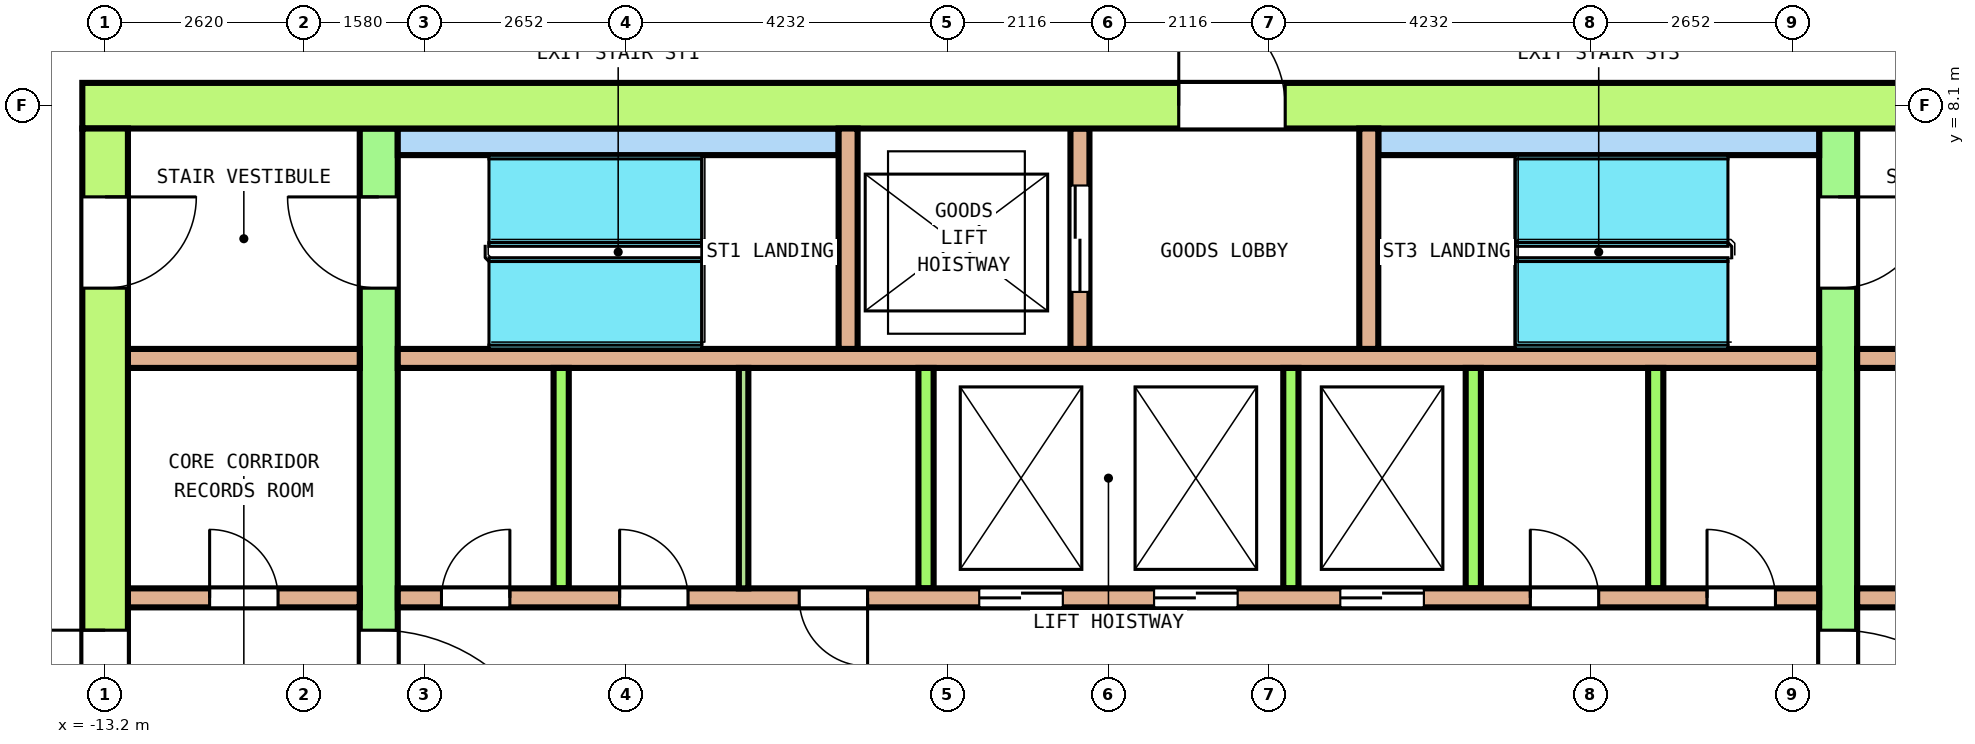
"""IFC4 building model, lengths in metres.
Left out: names, types, materials, properties, quantities, classifications, styles, units other than length and angle.
Written with IfcOpenShell. Run it as: python <this file> out.ifc"""

import sys

from ifc_helpers import new_model, si_unit, direction, frame, frame_2d, origin, place, context, subcontext, project, spatial, rectangle, extrude, element, fill, save


model = new_model("IFC4")
c1 = context("Model", 3, precision=1e-05, world=origin(), true_north=direction((0.0, 1.0)))
c2 = subcontext(c1, "Body", "Model", "MODEL_VIEW")
j1 = project(units=[si_unit("LENGTHUNIT", "METRE"), si_unit("PLANEANGLEUNIT", "RADIAN")], contexts=[c1])
p1 = place(None, origin())
s1 = spatial("IfcSite", under=j1, at=p1, CompositionType="ELEMENT")
p2 = place(p1, origin())
s2 = spatial("IfcBuilding", under=s1, at=p2, CompositionType="ELEMENT")
p3 = place(p2, frame((0.0, 0.0, 245.4)))
s3 = spatial("IfcBuildingStorey", under=s2, at=p3, CompositionType="ELEMENT", Elevation=245.4)
p4 = place(p3, frame((-13.5, 8.1, 0.0), z_axis=(0.0, 0.0, 1.0), x_axis=(1.0, 0.0, 0.0)))
e1 = element("IfcWall", 1, at=p4, inside=s3, PredefinedType="SHEAR", context=c2, shape_type="SweptSolid", body=[
    extrude(rectangle(XDim=27.0, YDim=0.6, at=frame_2d((13.5, 0.0))), origin(), (0.0, 0.0, 1.0), 3.7),
])
p5 = place(p4, frame((14.425, 0.0, 0.0)))
e2 = element("IfcOpeningElement", 2, at=p5, cuts=e1, PredefinedType="OPENING", context=c2, shape_type="SweptSolid", body=[
    extrude(rectangle(XDim=1.4, YDim=2.1, at=frame_2d((0.7, 1.05))), frame((0.0, 0.31, 0.0), z_axis=(0.0, -1.0, 0.0), x_axis=(1.0, 0.0, 0.0)), (0.0, 0.0, 1.0), 0.62),
])
p6 = place(p3, frame((-13.2, -7.8, 0.0), z_axis=(0.0, 0.0, 1.0), x_axis=(0.0, 1.0, 0.0)))
e3 = element("IfcWall", 3, at=p6, inside=s3, PredefinedType="SHEAR", context=c2, shape_type="SweptSolid", body=[
    extrude(rectangle(XDim=15.6, YDim=0.6, at=frame_2d((7.8, 0.0))), origin(), (0.0, 0.0, 1.0), 3.7),
])
p7 = place(p6, frame((6.6, 0.0, 0.0)))
e4 = element("IfcOpeningElement", 4, at=p7, cuts=e3, PredefinedType="OPENING", context=c2, shape_type="SweptSolid", body=[
    extrude(rectangle(XDim=2.4, YDim=2.1, at=frame_2d((1.2, 1.05))), frame((0.0, 0.31, 0.0), z_axis=(0.0, -1.0, 0.0), x_axis=(1.0, 0.0, 0.0)), (0.0, 0.0, 1.0), 0.62),
])
p8 = place(p6, frame((13.5, 0.0, 0.0)))
e5 = element("IfcOpeningElement", 5, at=p8, cuts=e3, PredefinedType="OPENING", context=c2, shape_type="SweptSolid", body=[
    extrude(rectangle(XDim=1.2, YDim=2.1, at=frame_2d((0.6, 1.05))), frame((0.0, 0.31, 0.0), z_axis=(0.0, -1.0, 0.0), x_axis=(1.0, 0.0, 0.0)), (0.0, 0.0, 1.0), 0.62),
])
p9 = place(p6, frame((0.9, 0.0, 0.0)))
e6 = element("IfcOpeningElement", 6, at=p9, cuts=e3, PredefinedType="OPENING", context=c2, shape_type="SweptSolid", body=[
    extrude(rectangle(XDim=1.2, YDim=2.1, at=frame_2d((0.6, 1.05))), frame((0.0, 0.31, 0.0), z_axis=(0.0, -1.0, 0.0), x_axis=(1.0, 0.0, 0.0)), (0.0, 0.0, 1.0), 0.62),
])
p10 = place(p3, frame((-9.6, -7.8, 0.0), z_axis=(0.0, 0.0, 1.0), x_axis=(0.0, 1.0, 0.0)))
e7 = element("IfcWall", 7, at=p10, inside=s3, PredefinedType="SHEAR", context=c2, shape_type="SweptSolid", body=[
    extrude(rectangle(XDim=15.6, YDim=0.5, at=frame_2d((7.8, 0.0))), origin(), (0.0, 0.0, 1.0), 3.7),
])
p11 = place(p10, frame((6.6, 0.0, 0.0)))
e8 = element("IfcOpeningElement", 8, at=p11, cuts=e7, PredefinedType="OPENING", context=c2, shape_type="SweptSolid", body=[
    extrude(rectangle(XDim=2.4, YDim=2.1, at=frame_2d((1.2, 1.05))), frame((0.0, 0.26, 0.0), z_axis=(0.0, -1.0, 0.0), x_axis=(1.0, 0.0, 0.0)), (0.0, 0.0, 1.0), 0.52),
])
p12 = place(p10, frame((13.5, 0.0, 0.0)))
e9 = element("IfcOpeningElement", 9, at=p12, cuts=e7, PredefinedType="OPENING", context=c2, shape_type="SweptSolid", body=[
    extrude(rectangle(XDim=1.2, YDim=2.1, at=frame_2d((0.6, 1.05))), frame((0.0, 0.26, 0.0), z_axis=(0.0, -1.0, 0.0), x_axis=(1.0, 0.0, 0.0)), (0.0, 0.0, 1.0), 0.52),
])
p13 = place(p10, frame((0.9, 0.0, 0.0)))
e10 = element("IfcOpeningElement", 10, at=p13, cuts=e7, PredefinedType="OPENING", context=c2, shape_type="SweptSolid", body=[
    extrude(rectangle(XDim=1.2, YDim=2.1, at=frame_2d((0.6, 1.05))), frame((0.0, 0.26, 0.0), z_axis=(0.0, -1.0, 0.0), x_axis=(1.0, 0.0, 0.0)), (0.0, 0.0, 1.0), 0.52),
])
p14 = place(p3, frame((9.6, -7.8, 0.0), z_axis=(0.0, 0.0, 1.0), x_axis=(0.0, 1.0, 0.0)))
e11 = element("IfcWall", 11, at=p14, inside=s3, PredefinedType="SHEAR", context=c2, shape_type="SweptSolid", body=[
    extrude(rectangle(XDim=15.6, YDim=0.5, at=frame_2d((7.8, 0.0))), origin(), (0.0, 0.0, 1.0), 3.7),
])
p15 = place(p14, frame((6.6, 0.0, 0.0)))
e12 = element("IfcOpeningElement", 12, at=p15, cuts=e11, PredefinedType="OPENING", context=c2, shape_type="SweptSolid", body=[
    extrude(rectangle(XDim=2.4, YDim=2.1, at=frame_2d((1.2, 1.05))), frame((0.0, 0.26, 0.0), z_axis=(0.0, -1.0, 0.0), x_axis=(1.0, 0.0, 0.0)), (0.0, 0.0, 1.0), 0.52),
])
p16 = place(p14, frame((13.5, 0.0, 0.0)))
e13 = element("IfcOpeningElement", 13, at=p16, cuts=e11, PredefinedType="OPENING", context=c2, shape_type="SweptSolid", body=[
    extrude(rectangle(XDim=1.2, YDim=2.1, at=frame_2d((0.6, 1.05))), frame((0.0, 0.26, 0.0), z_axis=(0.0, -1.0, 0.0), x_axis=(1.0, 0.0, 0.0)), (0.0, 0.0, 1.0), 0.52),
])
p17 = place(p14, frame((1.0, 0.0, 0.0)))
e14 = element("IfcOpeningElement", 14, at=p17, cuts=e11, PredefinedType="OPENING", context=c2, shape_type="SweptSolid", body=[
    extrude(rectangle(XDim=1.0, YDim=2.1, at=frame_2d((0.5, 1.05))), frame((0.0, 0.26, 0.0), z_axis=(0.0, -1.0, 0.0), x_axis=(1.0, 0.0, 0.0)), (0.0, 0.0, 1.0), 0.52),
])
p18 = place(p3, frame((-12.9, 1.625, 0.0), z_axis=(0.0, 0.0, 1.0), x_axis=(1.0, 0.0, 0.0)))
e15 = element("IfcWall", 15, at=p18, inside=s3, PredefinedType="SOLIDWALL", context=c2, shape_type="SweptSolid", body=[
    extrude(rectangle(XDim=3.05, YDim=0.25, at=frame_2d((1.525, 0.0))), origin(), (0.0, 0.0, 1.0), 3.7),
])
p19 = place(p18, frame((1.075, 0.0, 0.0)))
e16 = element("IfcOpeningElement", 16, at=p19, cuts=e15, PredefinedType="OPENING", context=c2, shape_type="SweptSolid", body=[
    extrude(rectangle(XDim=0.9, YDim=2.1, at=frame_2d((0.45, 1.05))), frame((0.0, 0.135, 0.0), z_axis=(0.0, -1.0, 0.0), x_axis=(1.0, 0.0, 0.0)), (0.0, 0.0, 1.0), 0.27),
])
p20 = place(p3, frame((-9.35, 1.625, 0.0), z_axis=(0.0, 0.0, 1.0), x_axis=(1.0, 0.0, 0.0)))
e17 = element("IfcWall", 17, at=p20, inside=s3, PredefinedType="SOLIDWALL", context=c2, shape_type="SweptSolid", body=[
    extrude(rectangle(XDim=18.7, YDim=0.25, at=frame_2d((9.35, 0.0))), origin(), (0.0, 0.0, 1.0), 3.7),
])
p21 = place(p20, frame((7.65, 0.0, 0.0)))
e18 = element("IfcOpeningElement", 18, at=p21, cuts=e17, PredefinedType="OPENING", context=c2, shape_type="SweptSolid", body=[
    extrude(rectangle(XDim=1.1, YDim=2.1, at=frame_2d((0.55, 1.05))), frame((0.0, 0.135, 0.0), z_axis=(0.0, -1.0, 0.0), x_axis=(1.0, 0.0, 0.0)), (0.0, 0.0, 1.0), 0.27),
])
p22 = place(p20, frame((9.95, 0.0, 0.0)))
e19 = element("IfcOpeningElement", 19, at=p22, cuts=e17, PredefinedType="OPENING", context=c2, shape_type="SweptSolid", body=[
    extrude(rectangle(XDim=1.1, YDim=2.1, at=frame_2d((0.55, 1.05))), frame((0.0, 0.135, 0.0), z_axis=(0.0, -1.0, 0.0), x_axis=(1.0, 0.0, 0.0)), (0.0, 0.0, 1.0), 0.27),
])
p23 = place(p20, frame((12.4, 0.0, 0.0)))
e20 = element("IfcOpeningElement", 20, at=p23, cuts=e17, PredefinedType="OPENING", context=c2, shape_type="SweptSolid", body=[
    extrude(rectangle(XDim=1.1, YDim=2.1, at=frame_2d((0.55, 1.05))), frame((0.0, 0.135, 0.0), z_axis=(0.0, -1.0, 0.0), x_axis=(1.0, 0.0, 0.0)), (0.0, 0.0, 1.0), 0.27),
])
p24 = place(p20, frame((0.575, 0.0, 0.0)))
e21 = element("IfcOpeningElement", 21, at=p24, cuts=e17, PredefinedType="OPENING", context=c2, shape_type="SweptSolid", body=[
    extrude(rectangle(XDim=0.9, YDim=2.1, at=frame_2d((0.45, 1.05))), frame((0.0, 0.135, 0.0), z_axis=(0.0, -1.0, 0.0), x_axis=(1.0, 0.0, 0.0)), (0.0, 0.0, 1.0), 0.27),
])
p25 = place(p20, frame((2.919, 0.0, 0.0)))
e22 = element("IfcOpeningElement", 22, at=p25, cuts=e17, PredefinedType="OPENING", context=c2, shape_type="SweptSolid", body=[
    extrude(rectangle(XDim=0.9, YDim=2.1, at=frame_2d((0.45, 1.05))), frame((0.0, 0.135, 0.0), z_axis=(0.0, -1.0, 0.0), x_axis=(1.0, 0.0, 0.0)), (0.0, 0.0, 1.0), 0.27),
])
p26 = place(p20, frame((5.281, 0.0, 0.0)))
e23 = element("IfcOpeningElement", 23, at=p26, cuts=e17, PredefinedType="OPENING", context=c2, shape_type="SweptSolid", body=[
    extrude(rectangle(XDim=0.9, YDim=2.1, at=frame_2d((0.45, 1.05))), frame((0.0, 0.135, 0.0), z_axis=(0.0, -1.0, 0.0), x_axis=(1.0, 0.0, 0.0)), (0.0, 0.0, 1.0), 0.27),
])
p27 = place(p20, frame((14.9, 0.0, 0.0)))
e24 = element("IfcOpeningElement", 24, at=p27, cuts=e17, PredefinedType="OPENING", context=c2, shape_type="SweptSolid", body=[
    extrude(rectangle(XDim=0.9, YDim=2.1, at=frame_2d((0.45, 1.05))), frame((0.0, 0.135, 0.0), z_axis=(0.0, -1.0, 0.0), x_axis=(1.0, 0.0, 0.0)), (0.0, 0.0, 1.0), 0.27),
])
p28 = place(p20, frame((17.225, 0.0, 0.0)))
e25 = element("IfcOpeningElement", 25, at=p28, cuts=e17, PredefinedType="OPENING", context=c2, shape_type="SweptSolid", body=[
    extrude(rectangle(XDim=0.9, YDim=2.1, at=frame_2d((0.45, 1.05))), frame((0.0, 0.135, 0.0), z_axis=(0.0, -1.0, 0.0), x_axis=(1.0, 0.0, 0.0)), (0.0, 0.0, 1.0), 0.27),
])
p29 = place(p3, frame((9.85, 1.625, 0.0), z_axis=(0.0, 0.0, 1.0), x_axis=(1.0, 0.0, 0.0)))
e26 = element("IfcWall", 26, at=p29, inside=s3, PredefinedType="SOLIDWALL", context=c2, shape_type="SweptSolid", body=[
    extrude(rectangle(XDim=3.05, YDim=0.25, at=frame_2d((1.525, 0.0))), origin(), (0.0, 0.0, 1.0), 3.7),
])
p30 = place(p29, frame((1.075, 0.0, 0.0)))
e27 = element("IfcOpeningElement", 27, at=p30, cuts=e26, PredefinedType="OPENING", context=c2, shape_type="SweptSolid", body=[
    extrude(rectangle(XDim=0.9, YDim=2.1, at=frame_2d((0.45, 1.05))), frame((0.0, 0.135, 0.0), z_axis=(0.0, -1.0, 0.0), x_axis=(1.0, 0.0, 0.0)), (0.0, 0.0, 1.0), 0.27),
])
p31 = place(p3, frame((-12.9, 4.775, 0.0), z_axis=(0.0, 0.0, 1.0), x_axis=(1.0, 0.0, 0.0)))
e28 = element("IfcWall", 28, at=p31, inside=s3, PredefinedType="SOLIDWALL", context=c2, shape_type="SweptSolid", body=[
    extrude(rectangle(XDim=3.05, YDim=0.25, at=frame_2d((1.525, 0.0))), origin(), (0.0, 0.0, 1.0), 3.7),
])
p32 = place(p3, frame((-9.35, 4.775, 0.0), z_axis=(0.0, 0.0, 1.0), x_axis=(1.0, 0.0, 0.0)))
e29 = element("IfcWall", 29, at=p32, inside=s3, PredefinedType="SOLIDWALL", context=c2, shape_type="SweptSolid", body=[
    extrude(rectangle(XDim=18.7, YDim=0.25, at=frame_2d((9.35, 0.0))), origin(), (0.0, 0.0, 1.0), 3.7),
])
p33 = place(p3, frame((9.85, 4.775, 0.0), z_axis=(0.0, 0.0, 1.0), x_axis=(1.0, 0.0, 0.0)))
e30 = element("IfcWall", 30, at=p33, inside=s3, PredefinedType="SOLIDWALL", context=c2, shape_type="SweptSolid", body=[
    extrude(rectangle(XDim=3.05, YDim=0.25, at=frame_2d((1.525, 0.0))), origin(), (0.0, 0.0, 1.0), 3.7),
])
for number, where, z_axis, x_axis in (
    (31, (-7.2, 1.75, 0.0), (0.0, 0.0, 1.0), (0.0, 1.0, 0.0)),
    (32, (-2.4, 1.75, 0.0), (0.0, 0.0, 1.0), (0.0, 1.0, 0.0)),
    (33, (2.4, 1.75, 0.0), (0.0, 0.0, 1.0), (0.0, 1.0, 0.0)),
    (34, (4.8, 1.75, 0.0), (0.0, 0.0, 1.0), (0.0, 1.0, 0.0)),
    (35, (7.2, 1.75, 0.0), (0.0, 0.0, 1.0), (0.0, 1.0, 0.0)),
):
    element("IfcWall", number, at=place(p3, frame(where, z_axis=z_axis, x_axis=x_axis)), inside=s3, PredefinedType="SOLIDWALL", context=c2, shape_type="SweptSolid", body=[
        extrude(rectangle(XDim=2.9, YDim=0.2, at=frame_2d((1.45, 0.0))), origin(), (0.0, 0.0, 1.0), 3.7),
    ])
for number, where, z_axis, x_axis in (
    (36, (-9.35, 7.625, 0.0), (0.0, 0.0, 1.0), (1.0, 0.0, 0.0)),
    (37, (3.55, 7.625, 0.0), (0.0, 0.0, 1.0), (1.0, 0.0, 0.0)),
):
    element("IfcWall", number, at=place(p3, frame(where, z_axis=z_axis, x_axis=x_axis)), inside=s3, PredefinedType="SOLIDWALL", context=c2, shape_type="SweptSolid", body=[
        extrude(rectangle(XDim=5.8, YDim=0.35, at=frame_2d((2.9, 0.0))), origin(), (0.0, 0.0, 1.0), 3.7),
    ])
p34 = place(p3, frame((-3.425, 4.9, 0.0), z_axis=(0.0, 0.0, 1.0), x_axis=(0.0, 1.0, 0.0)))
e38 = element("IfcWall", 38, at=p34, inside=s3, PredefinedType="SOLIDWALL", context=c2, shape_type="SweptSolid", body=[
    extrude(rectangle(XDim=2.9, YDim=0.25, at=frame_2d((1.45, 0.0))), origin(), (0.0, 0.0, 1.0), 3.7),
])
p35 = place(p3, frame((-0.375, 4.9, 0.0), z_axis=(0.0, 0.0, 1.0), x_axis=(0.0, 1.0, 0.0)))
e39 = element("IfcWall", 39, at=p35, inside=s3, PredefinedType="SOLIDWALL", context=c2, shape_type="SweptSolid", body=[
    extrude(rectangle(XDim=2.9, YDim=0.25, at=frame_2d((1.45, 0.0))), origin(), (0.0, 0.0, 1.0), 3.7),
])
p36 = place(p35, frame((0.75, 0.0, 0.0)))
e40 = element("IfcOpeningElement", 40, at=p36, cuts=e39, PredefinedType="OPENING", context=c2, shape_type="SweptSolid", body=[
    extrude(rectangle(XDim=1.4, YDim=2.1, at=frame_2d((0.7, 1.05))), frame((0.0, 0.135, 0.0), z_axis=(0.0, -1.0, 0.0), x_axis=(1.0, 0.0, 0.0)), (0.0, 0.0, 1.0), 0.27),
])
p37 = place(p3, frame((3.425, 4.9, 0.0), z_axis=(0.0, 0.0, 1.0), x_axis=(0.0, 1.0, 0.0)))
e41 = element("IfcWall", 41, at=p37, inside=s3, PredefinedType="SOLIDWALL", context=c2, shape_type="SweptSolid", body=[
    extrude(rectangle(XDim=2.9, YDim=0.25, at=frame_2d((1.45, 0.0))), origin(), (0.0, 0.0, 1.0), 3.7),
])
p38 = place(p3, frame((-4.8, 1.75, 0.0), z_axis=(0.0, 0.0, 1.0), x_axis=(0.0, 1.0, 0.0)))
e42 = element("IfcWall", 42, at=p38, inside=s3, PredefinedType="PARTITIONING", context=c2, shape_type="SweptSolid", body=[
    extrude(rectangle(XDim=2.9, YDim=0.125, at=frame_2d((1.45, 0.0))), origin(), (0.0, 0.0, 1.0), 3.7),
])
p39 = place(p21, origin())
e43 = element("IfcDoor", 43, at=p39, inside=s3, OperationType="DOUBLE_DOOR_SLIDING", PredefinedType="DOOR", context=c2, shape_type="SweptSolid", body=[
    extrude(rectangle(XDim=1.1, YDim=2.1, at=frame_2d((0.55, 1.05))), frame((0.0, 0.075, 0.0), z_axis=(0.0, -1.0, 0.0), x_axis=(1.0, 0.0, 0.0)), (0.0, 0.0, 1.0), 0.15),
])
fill(e18, e43)
p40 = place(p22, origin())
e44 = element("IfcDoor", 44, at=p40, inside=s3, OperationType="DOUBLE_DOOR_SLIDING", PredefinedType="DOOR", context=c2, shape_type="SweptSolid", body=[
    extrude(rectangle(XDim=1.1, YDim=2.1, at=frame_2d((0.55, 1.05))), frame((0.0, 0.075, 0.0), z_axis=(0.0, -1.0, 0.0), x_axis=(1.0, 0.0, 0.0)), (0.0, 0.0, 1.0), 0.15),
])
fill(e19, e44)
p41 = place(p23, origin())
e45 = element("IfcDoor", 45, at=p41, inside=s3, OperationType="DOUBLE_DOOR_SLIDING", PredefinedType="DOOR", context=c2, shape_type="SweptSolid", body=[
    extrude(rectangle(XDim=1.1, YDim=2.1, at=frame_2d((0.55, 1.05))), frame((0.0, 0.075, 0.0), z_axis=(0.0, -1.0, 0.0), x_axis=(1.0, 0.0, 0.0)), (0.0, 0.0, 1.0), 0.15),
])
fill(e20, e45)
p42 = place(p36, origin())
e46 = element("IfcDoor", 46, at=p42, inside=s3, OperationType="DOUBLE_DOOR_SLIDING", PredefinedType="DOOR", context=c2, shape_type="SweptSolid", body=[
    extrude(rectangle(XDim=1.4, YDim=2.1, at=frame_2d((0.7, 1.05))), frame((0.0, 0.075, 0.0), z_axis=(0.0, -1.0, 0.0), x_axis=(1.0, 0.0, 0.0)), (0.0, 0.0, 1.0), 0.15),
])
fill(e40, e46)
p43 = place(p11, origin())
e47 = element("IfcDoor", 47, at=p43, inside=s3, OperationType="DOUBLE_DOOR_SINGLE_SWING", PredefinedType="DOOR", context=c2, shape_type="SweptSolid", body=[
    extrude(rectangle(XDim=2.4, YDim=2.1, at=frame_2d((1.2, 1.05))), frame((0.0, 0.2, 0.0), z_axis=(0.0, -1.0, 0.0), x_axis=(1.0, 0.0, 0.0)), (0.0, 0.0, 1.0), 0.4),
])
fill(e8, e47)
p44 = place(p15, origin())
e48 = element("IfcDoor", 48, at=p44, inside=s3, OperationType="DOUBLE_DOOR_SINGLE_SWING", PredefinedType="DOOR", context=c2, shape_type="SweptSolid", body=[
    extrude(rectangle(XDim=2.4, YDim=2.1, at=frame_2d((1.2, 1.05))), frame((0.0, 0.2, 0.0), z_axis=(0.0, -1.0, 0.0), x_axis=(1.0, 0.0, 0.0)), (0.0, 0.0, 1.0), 0.4),
])
fill(e12, e48)
p45 = place(p7, origin())
e49 = element("IfcDoor", 49, at=p45, inside=s3, OperationType="DOUBLE_DOOR_SINGLE_SWING", PredefinedType="DOOR", context=c2, shape_type="SweptSolid", body=[
    extrude(rectangle(XDim=2.4, YDim=2.1, at=frame_2d((1.2, 1.05))), frame((0.0, 0.25, 0.0), z_axis=(0.0, -1.0, 0.0), x_axis=(1.0, 0.0, 0.0)), (0.0, 0.0, 1.0), 0.5),
])
fill(e4, e49)
p46 = place(p12, origin())
e50 = element("IfcDoor", 50, at=p46, inside=s3, OperationType="SINGLE_SWING_RIGHT", PredefinedType="DOOR", context=c2, shape_type="SweptSolid", body=[
    extrude(rectangle(XDim=1.2, YDim=2.1, at=frame_2d((0.6, 1.05))), frame((0.0, 0.2, 0.0), z_axis=(0.0, -1.0, 0.0), x_axis=(1.0, 0.0, 0.0)), (0.0, 0.0, 1.0), 0.4),
])
fill(e9, e50)
p47 = place(p8, origin())
e51 = element("IfcDoor", 51, at=p47, inside=s3, OperationType="SINGLE_SWING_LEFT", PredefinedType="DOOR", context=c2, shape_type="SweptSolid", body=[
    extrude(rectangle(XDim=1.2, YDim=2.1, at=frame_2d((0.6, 1.05))), frame((0.0, 0.25, 0.0), z_axis=(0.0, -1.0, 0.0), x_axis=(1.0, 0.0, 0.0)), (0.0, 0.0, 1.0), 0.5),
])
fill(e5, e51)
p48 = place(p16, origin())
e52 = element("IfcDoor", 52, at=p48, inside=s3, OperationType="SINGLE_SWING_RIGHT", PredefinedType="DOOR", context=c2, shape_type="SweptSolid", body=[
    extrude(rectangle(XDim=1.2, YDim=2.1, at=frame_2d((0.6, 1.05))), frame((0.0, 0.2, 0.0), z_axis=(0.0, -1.0, 0.0), x_axis=(1.0, 0.0, 0.0)), (0.0, 0.0, 1.0), 0.4),
])
fill(e13, e52)
p49 = place(p5, origin())
e53 = element("IfcDoor", 53, at=p49, inside=s3, OperationType="DOUBLE_DOOR_SINGLE_SWING", PredefinedType="DOOR", context=c2, shape_type="SweptSolid", body=[
    extrude(rectangle(XDim=1.4, YDim=2.1, at=frame_2d((0.7, 1.05))), frame((0.0, 0.25, 0.0), z_axis=(0.0, -1.0, 0.0), x_axis=(1.0, 0.0, 0.0)), (0.0, 0.0, 1.0), 0.5),
])
fill(e2, e53)
p50 = place(p19, origin())
e54 = element("IfcDoor", 54, at=p50, inside=s3, OperationType="SINGLE_SWING_RIGHT", PredefinedType="DOOR", context=c2, shape_type="SweptSolid", body=[
    extrude(rectangle(XDim=0.9, YDim=2.1, at=frame_2d((0.45, 1.05))), frame((0.0, 0.075, 0.0), z_axis=(0.0, -1.0, 0.0), x_axis=(1.0, 0.0, 0.0)), (0.0, 0.0, 1.0), 0.15),
])
fill(e16, e54)
p51 = place(p24, origin())
e55 = element("IfcDoor", 55, at=p51, inside=s3, OperationType="SINGLE_SWING_LEFT", PredefinedType="DOOR", context=c2, shape_type="SweptSolid", body=[
    extrude(rectangle(XDim=0.9, YDim=2.1, at=frame_2d((0.45, 1.05))), frame((0.0, 0.075, 0.0), z_axis=(0.0, -1.0, 0.0), x_axis=(1.0, 0.0, 0.0)), (0.0, 0.0, 1.0), 0.15),
])
fill(e21, e55)
p52 = place(p25, origin())
e56 = element("IfcDoor", 56, at=p52, inside=s3, OperationType="SINGLE_SWING_RIGHT", PredefinedType="DOOR", context=c2, shape_type="SweptSolid", body=[
    extrude(rectangle(XDim=0.9, YDim=2.1, at=frame_2d((0.45, 1.05))), frame((0.0, 0.075, 0.0), z_axis=(0.0, -1.0, 0.0), x_axis=(1.0, 0.0, 0.0)), (0.0, 0.0, 1.0), 0.15),
])
fill(e22, e56)
p53 = place(p26, origin())
e57 = element("IfcDoor", 57, at=p53, inside=s3, OperationType="SINGLE_SWING_LEFT", PredefinedType="DOOR", context=c2, shape_type="SweptSolid", body=[
    extrude(rectangle(XDim=0.9, YDim=2.1, at=frame_2d((0.45, 1.05))), frame((0.0, 0.075, 0.0), z_axis=(0.0, -1.0, 0.0), x_axis=(1.0, 0.0, 0.0)), (0.0, 0.0, 1.0), 0.15),
])
fill(e23, e57)
p54 = place(p27, origin())
e58 = element("IfcDoor", 58, at=p54, inside=s3, OperationType="SINGLE_SWING_RIGHT", PredefinedType="DOOR", context=c2, shape_type="SweptSolid", body=[
    extrude(rectangle(XDim=0.9, YDim=2.1, at=frame_2d((0.45, 1.05))), frame((0.0, 0.075, 0.0), z_axis=(0.0, -1.0, 0.0), x_axis=(1.0, 0.0, 0.0)), (0.0, 0.0, 1.0), 0.15),
])
fill(e24, e58)
p55 = place(p28, origin())
e59 = element("IfcDoor", 59, at=p55, inside=s3, OperationType="SINGLE_SWING_LEFT", PredefinedType="DOOR", context=c2, shape_type="SweptSolid", body=[
    extrude(rectangle(XDim=0.9, YDim=2.1, at=frame_2d((0.45, 1.05))), frame((0.0, 0.075, 0.0), z_axis=(0.0, -1.0, 0.0), x_axis=(1.0, 0.0, 0.0)), (0.0, 0.0, 1.0), 0.15),
])
fill(e25, e59)
save(model, sys.argv[1])
